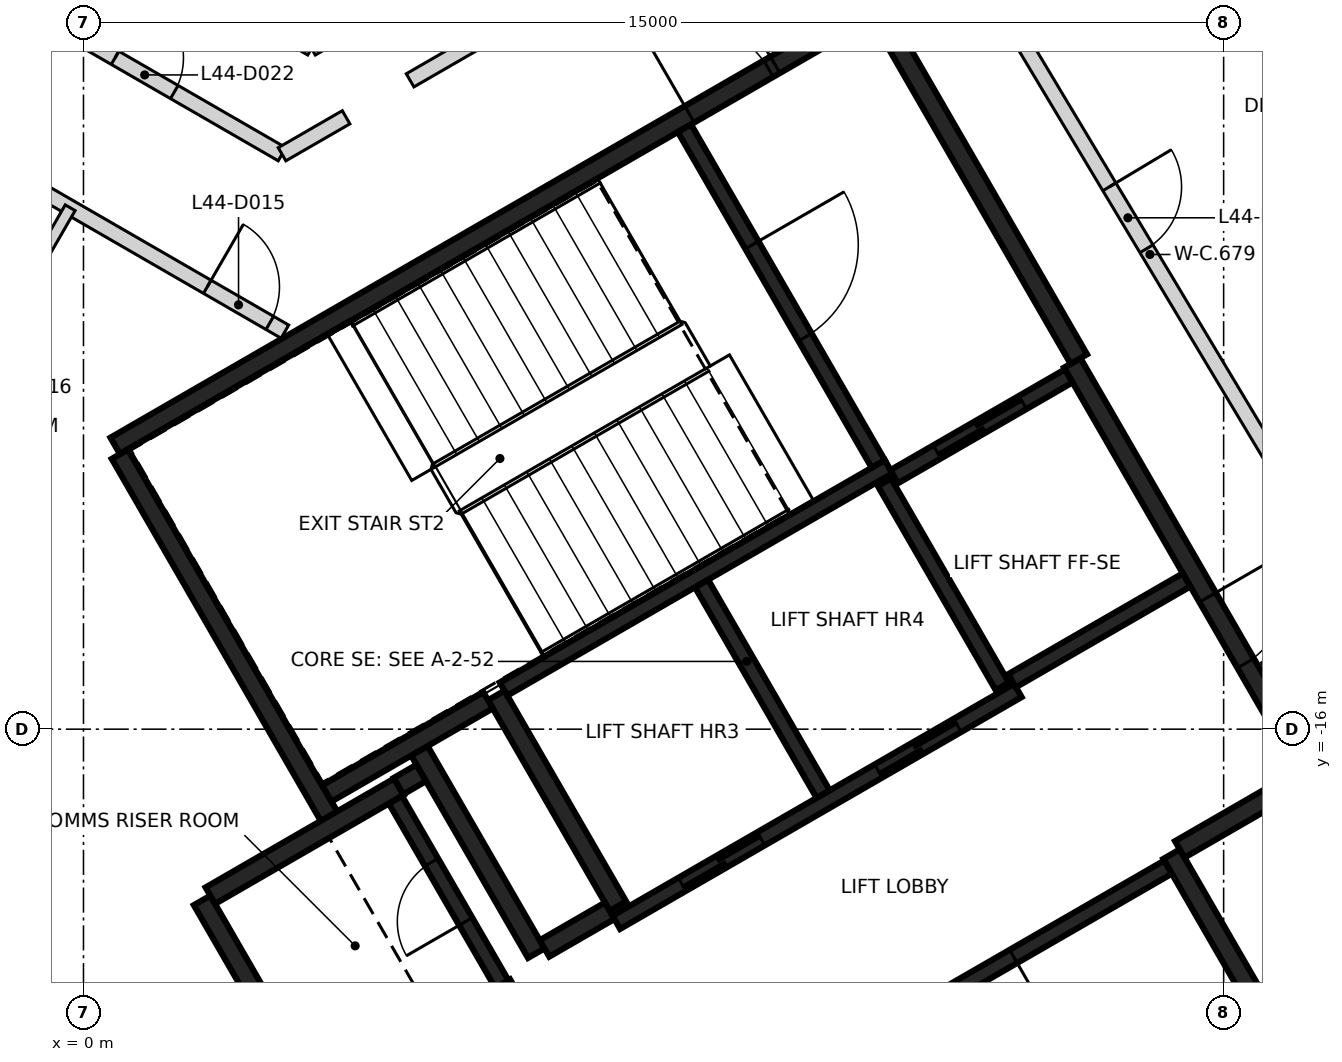
"""IFC4 building model, lengths in metres.
Left out: names, types, materials, properties, quantities, classifications, styles, units other than length and angle.
Written with IfcOpenShell. Run it as: python <this file> out.ifc"""

import sys

from ifc_helpers import new_model, si_unit, direction, frame, frame_2d, origin, place, context, subcontext, project, spatial, rectangle, extrude, element, fill, save


model = new_model("IFC4")
c1 = context("Model", 3, precision=1e-05, world=origin(), true_north=direction((0.0, 1.0)))
c2 = subcontext(c1, "Body", "Model", "MODEL_VIEW")
j1 = project(units=[si_unit("LENGTHUNIT", "METRE"), si_unit("PLANEANGLEUNIT", "RADIAN")], contexts=[c1])
p1 = place(None, origin())
s1 = spatial("IfcSite", under=j1, at=p1, CompositionType="ELEMENT")
p2 = place(p1, origin())
s2 = spatial("IfcBuilding", under=s1, at=p2, CompositionType="ELEMENT")
p3 = place(p2, frame((0.0, 0.0, 179.2)))
s3 = spatial("IfcBuildingStorey", under=s2, at=p3, CompositionType="ELEMENT", Elevation=179.2)
p4 = place(p3, frame((0.417, -12.273, 0.0), z_axis=(0.0, 0.0, 1.0), x_axis=(0.866021906294, 0.500006057782, 0.0)))
e1 = element("IfcWall", 1, at=p4, inside=s3, PredefinedType="SHEAR", context=c2, shape_type="SweptSolid", body=[
    extrude(rectangle(XDim=11.55, YDim=0.25, at=frame_2d((5.775, 0.0))), origin(), (0.0, 0.0, 1.0), 3.25),
])
p5 = place(p4, frame((10.025, 0.0, 0.0)))
e2 = element("IfcOpeningElement", 2, at=p5, cuts=e1, PredefinedType="OPENING", context=c2, shape_type="SweptSolid", body=[
    extrude(rectangle(XDim=1.2, YDim=2.1, at=frame_2d((0.6, 1.05))), frame((0.0, 0.135, 0.0), z_axis=(0.0, -1.0, 0.0), x_axis=(1.0, 0.0, 0.0)), (0.0, 0.0, 1.0), 0.27),
])
p6 = place(p4, frame((8.725, 0.0, 0.0)))
e3 = element("IfcOpeningElement", 3, at=p6, cuts=e1, PredefinedType="OPENING", context=c2, shape_type="SweptSolid", body=[
    extrude(rectangle(XDim=1.2, YDim=2.1, at=frame_2d((0.6, 1.05))), frame((0.0, 0.135, 0.0), z_axis=(0.0, -1.0, 0.0), x_axis=(1.0, 0.0, 0.0)), (0.0, 0.0, 1.0), 0.27),
])
p7 = place(p3, frame((13.008, -11.181, 0.0), z_axis=(0.0, 0.0, 1.0), x_axis=(0.500004234368, -0.866022959057, 0.0)))
e4 = element("IfcWall", 4, at=p7, inside=s3, PredefinedType="SHEAR", context=c2, shape_type="SweptSolid", body=[
    extrude(rectangle(XDim=6.25, YDim=0.25, at=frame_2d((3.125, 0.0))), origin(), (0.0, 0.0, 1.0), 3.25),
])
p8 = place(p7, frame((3.563, 0.0, 0.0)))
e5 = element("IfcOpeningElement", 5, at=p8, cuts=e4, PredefinedType="OPENING", context=c2, shape_type="SweptSolid", body=[
    extrude(rectangle(XDim=1.0, YDim=2.1, at=frame_2d((0.5, 1.05))), frame((0.0, 0.135, 0.0), z_axis=(0.0, -1.0, 0.0), x_axis=(1.0, 0.0, 0.0)), (0.0, 0.0, 1.0), 0.27),
])
p9 = place(p3, frame((3.235, -17.153, 0.0), z_axis=(0.0, 0.0, 1.0), x_axis=(-0.500008851346, 0.866020293397, 0.0)))
e6 = element("IfcWall", 6, at=p9, inside=s3, PredefinedType="SHEAR", context=c2, shape_type="SweptSolid", body=[
    extrude(rectangle(XDim=5.51, YDim=0.25, at=frame_2d((2.755, 0.0))), origin(), (0.0, 0.0, 1.0), 3.25),
])
p10 = place(p3, frame((10.483, -6.606, 0.0), z_axis=(0.0, 0.0, 1.0), x_axis=(0.49999885962, -0.866026062182, 0.0)))
e7 = element("IfcWall", 7, at=p10, inside=s3, PredefinedType="SHEAR", context=c2, shape_type="SweptSolid", body=[
    extrude(rectangle(XDim=5.225, YDim=0.25, at=frame_2d((2.612, 0.0))), origin(), (0.0, 0.0, 1.0), 3.25),
])
p11 = place(p3, frame((7.031, -18.327, 0.0), z_axis=(0.0, 0.0, 1.0), x_axis=(-0.499971222258, 0.866042017984, 0.0)))
e8 = element("IfcWall", 8, at=p11, inside=s3, PredefinedType="SHEAR", context=c2, shape_type="SweptSolid", body=[
    extrude(rectangle(XDim=3.2, YDim=0.25, at=frame_2d((1.6, 0.0))), origin(), (0.0, 0.0, 1.0), 3.25),
])
p12 = place(p3, frame((14.315, -17.644, 0.0), z_axis=(0.0, 0.0, 1.0), x_axis=(0.500023226632, -0.866011993467, 0.0)))
e9 = element("IfcWall", 9, at=p12, inside=s3, PredefinedType="SHEAR", context=c2, shape_type="SweptSolid", body=[
    extrude(rectangle(XDim=2.974, YDim=0.25, at=frame_2d((1.487, 0.0))), origin(), (0.0, 0.0, 1.0), 3.25),
])
p13 = place(p3, frame((3.085, -20.894, 0.0), z_axis=(0.0, 0.0, 1.0), x_axis=(-0.499978833458, 0.866037623948, 0.0)))
e10 = element("IfcWall", 10, at=p13, inside=s3, PredefinedType="SHEAR", context=c2, shape_type="SweptSolid", body=[
    extrude(rectangle(XDim=3.05, YDim=0.25, at=frame_2d((1.525, 0.0))), origin(), (0.0, 0.0, 1.0), 3.25),
])
p14 = place(p3, frame((1.669, -18.19, 0.0), z_axis=(0.0, 0.0, 1.0), x_axis=(0.866042235819, 0.499970844928, 0.0)))
e11 = element("IfcWall", 11, at=p14, inside=s3, PredefinedType="SHEAR", context=c2, shape_type="SweptSolid", body=[
    extrude(rectangle(XDim=2.865, YDim=0.25, at=frame_2d((1.432, 0.0))), origin(), (0.0, 0.0, 1.0), 3.25),
])
p15 = place(p3, frame((5.675, -19.399, 0.0), z_axis=(0.0, 0.0, 1.0), x_axis=(-0.866026637627, -0.499997862916, 0.0)))
e12 = element("IfcWall", 12, at=p15, inside=s3, PredefinedType="SHEAR", context=c2, shape_type="SweptSolid", body=[
    extrude(rectangle(XDim=2.865, YDim=0.25, at=frame_2d((1.432, 0.0))), origin(), (0.0, 0.0, 1.0), 3.25),
])
p16 = place(p3, frame((4.414, -16.276, 0.0), z_axis=(0.0, 0.0, 1.0), x_axis=(0.500003324108, -0.866023484601, 0.0)))
e13 = element("IfcWall", 13, at=p16, inside=s3, PredefinedType="SHEAR", context=c2, shape_type="SweptSolid", body=[
    extrude(rectangle(XDim=3.085, YDim=0.25, at=frame_2d((1.542, 0.0))), origin(), (0.0, 0.0, 1.0), 3.25),
])
p17 = place(p3, frame((5.322, -15.619, 0.0), z_axis=(0.0, 0.0, 1.0), x_axis=(-0.866026229868, -0.499998569178, 0.0)))
e14 = element("IfcWall", 14, at=p17, inside=s3, PredefinedType="SHEAR", context=c2, shape_type="SweptSolid", body=[
    extrude(rectangle(XDim=2.449, YDim=0.25, at=frame_2d((1.225, 0.0))), origin(), (0.0, 0.0, 1.0), 3.25),
])
p18 = place(p3, frame((16.025, -16.656, 0.0), z_axis=(0.0, 0.0, 1.0), x_axis=(-0.866016279763, -0.500015802937, 0.0)))
e15 = element("IfcWall", 15, at=p18, inside=s3, PredefinedType="SHEAR", context=c2, shape_type="SweptSolid", body=[
    extrude(rectangle(XDim=1.849, YDim=0.25, at=frame_2d((0.925, 0.0))), origin(), (0.0, 0.0, 1.0), 3.25),
])
p19 = place(p3, frame((6.065, -18.885, 0.0), z_axis=(0.0, 0.0, 1.0), x_axis=(0.866017078145, 0.500014420154, 0.0)))
e16 = element("IfcWall", 16, at=p19, inside=s3, PredefinedType="SHEAR", context=c2, shape_type="SweptSolid", body=[
    extrude(rectangle(XDim=0.989, YDim=0.25, at=frame_2d((0.495, 0.0))), origin(), (0.0, 0.0, 1.0), 3.25),
])
p20 = place(p3, frame((4.145, -16.749, 0.0), z_axis=(0.0, 0.0, 1.0), x_axis=(0.866185586049, 0.49972245349, 0.0)))
e17 = element("IfcWall", 17, at=p20, inside=s3, PredefinedType="SHEAR", context=c2, shape_type="SweptSolid", body=[
    extrude(rectangle(XDim=0.344, YDim=0.25, at=frame_2d((0.172, 0.0))), origin(), (0.0, 0.0, 1.0), 3.25),
])
p21 = place(p3, frame((5.526, -15.472, 0.0), z_axis=(0.0, 0.0, 1.0), x_axis=(0.866041752167, 0.499971682701, 0.0)))
e18 = element("IfcWall", 18, at=p21, inside=s3, PredefinedType="SHEAR", context=c2, shape_type="SweptSolid", body=[
    extrude(rectangle(XDim=5.851, YDim=0.2, at=frame_2d((2.925, 0.0))), origin(), (0.0, 0.0, 1.0), 3.25),
])
p22 = place(p3, frame((7.01, -18.542, 0.0), z_axis=(0.0, 0.0, 1.0), x_axis=(0.866030299012, 0.499991521122, 0.0)))
e19 = element("IfcWall", 19, at=p22, inside=s3, PredefinedType="SHEAR", context=c2, shape_type="SweptSolid", body=[
    extrude(rectangle(XDim=6.1, YDim=0.2, at=frame_2d((3.05, 0.0))), origin(), (0.0, 0.0, 1.0), 3.25),
])
p23 = place(p22, frame((1.0, 0.0, 0.0)))
e20 = element("IfcOpeningElement", 20, at=p23, cuts=e19, PredefinedType="OPENING", context=c2, shape_type="SweptSolid", body=[
    extrude(rectangle(XDim=1.2, YDim=2.1, at=frame_2d((0.6, 1.05))), frame((0.0, 0.11, 0.0), z_axis=(0.0, -1.0, 0.0), x_axis=(1.0, 0.0, 0.0)), (0.0, 0.0, 1.0), 0.22),
])
p24 = place(p22, frame((3.982, 0.0, 0.0)))
e21 = element("IfcOpeningElement", 21, at=p24, cuts=e19, PredefinedType="OPENING", context=c2, shape_type="SweptSolid", body=[
    extrude(rectangle(XDim=1.2, YDim=2.1, at=frame_2d((0.6, 1.05))), frame((0.0, 0.11, 0.0), z_axis=(0.0, -1.0, 0.0), x_axis=(1.0, 0.0, 0.0)), (0.0, 0.0, 1.0), 0.22),
])
p25 = place(p3, frame((14.268, -17.815, 0.0), z_axis=(0.0, 0.0, 1.0), x_axis=(-0.866033794273, -0.499985466966, 0.0)))
e22 = element("IfcWall", 22, at=p25, inside=s3, PredefinedType="SHEAR", context=c2, shape_type="SweptSolid", body=[
    extrude(rectangle(XDim=5.598, YDim=0.2, at=frame_2d((2.799, 0.0))), origin(), (0.0, 0.0, 1.0), 3.25),
])
p26 = place(p25, frame((2.349, 0.0, 0.0)))
e23 = element("IfcOpeningElement", 23, at=p26, cuts=e22, PredefinedType="OPENING", context=c2, shape_type="SweptSolid", body=[
    extrude(rectangle(XDim=0.9, YDim=2.1, at=frame_2d((0.45, 1.05))), frame((0.0, 0.11, 0.0), z_axis=(0.0, -1.0, 0.0), x_axis=(1.0, 0.0, 0.0)), (0.0, 0.0, 1.0), 0.22),
])
p27 = place(p3, frame((7.906, -8.094, 0.0), z_axis=(0.0, 0.0, 1.0), x_axis=(0.500027839223, -0.866009330205, 0.0)))
e24 = element("IfcWall", 24, at=p27, inside=s3, PredefinedType="SHEAR", context=c2, shape_type="SweptSolid", body=[
    extrude(rectangle(XDim=5.098, YDim=0.2, at=frame_2d((2.549, 0.0))), origin(), (0.0, 0.0, 1.0), 3.25),
])
p28 = place(p27, frame((1.774, 0.0, 0.0)))
e25 = element("IfcOpeningElement", 25, at=p28, cuts=e24, PredefinedType="OPENING", context=c2, shape_type="SweptSolid", body=[
    extrude(rectangle(XDim=1.4, YDim=2.1, at=frame_2d((0.7, 1.05))), frame((0.0, 0.11, 0.0), z_axis=(0.0, -1.0, 0.0), x_axis=(1.0, 0.0, 0.0)), (0.0, 0.0, 1.0), 0.22),
])
p29 = place(p3, frame((8.132, -14.084, 0.0), z_axis=(0.0, 0.0, 1.0), x_axis=(0.499997778408, -0.866026686418, 0.0)))
e26 = element("IfcWall", 26, at=p29, inside=s3, PredefinedType="SHEAR", context=c2, shape_type="SweptSolid", body=[
    extrude(rectangle(XDim=3.198, YDim=0.2, at=frame_2d((1.599, 0.0))), origin(), (0.0, 0.0, 1.0), 3.25),
])
p30 = place(p3, frame((5.503, -19.352, 0.0), z_axis=(0.0, 0.0, 1.0), x_axis=(-0.499986818241, 0.866033014143, 0.0)))
e27 = element("IfcWall", 27, at=p30, inside=s3, PredefinedType="SHEAR", context=c2, shape_type="SweptSolid", body=[
    extrude(rectangle(XDim=2.798, YDim=0.2, at=frame_2d((1.399, 0.0))), origin(), (0.0, 0.0, 1.0), 3.25),
])
p31 = place(p30, frame((0.949, 0.0, 0.0)))
e28 = element("IfcOpeningElement", 28, at=p31, cuts=e27, PredefinedType="OPENING", context=c2, shape_type="SweptSolid", body=[
    extrude(rectangle(XDim=0.9, YDim=2.1, at=frame_2d((0.45, 1.05))), frame((0.0, 0.11, 0.0), z_axis=(0.0, -1.0, 0.0), x_axis=(1.0, 0.0, 0.0)), (0.0, 0.0, 1.0), 0.22),
])
p32 = place(p3, frame((12.088, -15.437, 0.0), z_axis=(0.0, 0.0, 1.0), x_axis=(-0.500026960575, 0.86600983753, 0.0)))
e29 = element("IfcWall", 29, at=p32, inside=s3, PredefinedType="SHEAR", context=c2, shape_type="SweptSolid", body=[
    extrude(rectangle(XDim=3.1, YDim=0.2, at=frame_2d((1.55, 0.0))), origin(), (0.0, 0.0, 1.0), 3.25),
])
p33 = place(p3, frame((10.666, -12.678, 0.0), z_axis=(0.0, 0.0, 1.0), x_axis=(0.866018407898, 0.500012117035, 0.0)))
e30 = element("IfcWall", 30, at=p33, inside=s3, PredefinedType="SHEAR", context=c2, shape_type="SweptSolid", body=[
    extrude(rectangle(XDim=2.651, YDim=0.2, at=frame_2d((1.325, 0.0))), origin(), (0.0, 0.0, 1.0), 3.25),
])
p34 = place(p33, frame((0.652, 0.0, 0.0)))
e31 = element("IfcOpeningElement", 31, at=p34, cuts=e30, PredefinedType="OPENING", context=c2, shape_type="SweptSolid", body=[
    extrude(rectangle(XDim=1.3, YDim=2.1, at=frame_2d((0.65, 1.05))), frame((0.0, 0.11, 0.0), z_axis=(0.0, -1.0, 0.0), x_axis=(1.0, 0.0, 0.0)), (0.0, 0.0, 1.0), 0.22),
])
p35 = place(p3, frame((14.512, -14.037, 0.0), z_axis=(0.0, 0.0, 1.0), x_axis=(-0.866018407898, -0.500012117035, 0.0)))
e32 = element("IfcWall", 32, at=p35, inside=s3, PredefinedType="SHEAR", context=c2, shape_type="SweptSolid", body=[
    extrude(rectangle(XDim=2.651, YDim=0.2, at=frame_2d((1.325, 0.0))), origin(), (0.0, 0.0, 1.0), 3.25),
])
p36 = place(p3, frame((-8.612, -1.956, 0.0), z_axis=(0.0, 0.0, 1.0), x_axis=(0.866034386606, -0.499984440973, 0.0)))
e33 = element("IfcWall", 33, at=p36, inside=s3, PredefinedType="PARTITIONING", context=c2, shape_type="SweptSolid", body=[
    extrude(rectangle(XDim=12.96, YDim=0.2, at=frame_2d((6.48, 0.0))), origin(), (0.0, 0.0, 1.0), 3.25),
])
p37 = place(p36, frame((3.955, 0.0, 0.0)))
e34 = element("IfcOpeningElement", 34, at=p37, cuts=e33, PredefinedType="OPENING", context=c2, shape_type="SweptSolid", body=[
    extrude(rectangle(XDim=0.9, YDim=2.1, at=frame_2d((0.45, 1.05))), frame((0.0, 0.11, 0.0), z_axis=(0.0, -1.0, 0.0), x_axis=(1.0, 0.0, 0.0)), (0.0, 0.0, 1.0), 0.22),
])
p38 = place(p36, frame((10.424, 0.0, 0.0)))
e35 = element("IfcOpeningElement", 35, at=p38, cuts=e33, PredefinedType="OPENING", context=c2, shape_type="SweptSolid", body=[
    extrude(rectangle(XDim=0.9, YDim=2.1, at=frame_2d((0.45, 1.05))), frame((0.0, 0.11, 0.0), z_axis=(0.0, -1.0, 0.0), x_axis=(1.0, 0.0, 0.0)), (0.0, 0.0, 1.0), 0.22),
])
p39 = place(p3, frame((-8.33, -4.428, 0.0), z_axis=(0.0, 0.0, 1.0), x_axis=(0.865923263811, -0.500176869909, 0.0)))
e36 = element("IfcWall", 36, at=p39, inside=s3, PredefinedType="PARTITIONING", context=c2, shape_type="SweptSolid", body=[
    extrude(rectangle(XDim=12.68, YDim=0.2, at=frame_2d((6.34, 0.0))), origin(), (0.0, 0.0, 1.0), 3.25),
])
p40 = place(p39, frame((2.87, 0.0, 0.0)))
e37 = element("IfcOpeningElement", 37, at=p40, cuts=e36, PredefinedType="OPENING", context=c2, shape_type="SweptSolid", body=[
    extrude(rectangle(XDim=0.95, YDim=2.1, at=frame_2d((0.475, 1.05))), frame((0.0, 0.11, 0.0), z_axis=(0.0, -1.0, 0.0), x_axis=(1.0, 0.0, 0.0)), (0.0, 0.0, 1.0), 0.22),
])
p41 = place(p39, frame((11.5, 0.0, 0.0)))
e38 = element("IfcOpeningElement", 38, at=p41, cuts=e36, PredefinedType="OPENING", context=c2, shape_type="SweptSolid", body=[
    extrude(rectangle(XDim=0.95, YDim=2.1, at=frame_2d((0.475, 1.05))), frame((0.0, 0.11, 0.0), z_axis=(0.0, -1.0, 0.0), x_axis=(1.0, 0.0, 0.0)), (0.0, 0.0, 1.0), 0.22),
])
p42 = place(p3, frame((2.612, -8.437, 0.0), z_axis=(0.0, 0.0, 1.0), x_axis=(0.866026830048, 0.499997529631, 0.0)))
e39 = element("IfcWall", 39, at=p42, inside=s3, PredefinedType="PARTITIONING", context=c2, shape_type="SweptSolid", body=[
    extrude(rectangle(XDim=0.973, YDim=0.2, at=frame_2d((0.487, 0.0))), origin(), (0.0, 0.0, 1.0), 3.25),
])
p43 = place(p3, frame((4.297, -7.464, 0.0), z_axis=(0.0, 0.0, 1.0), x_axis=(0.866026378386, 0.499998311937, 0.0)))
e40 = element("IfcWall", 40, at=p43, inside=s3, PredefinedType="PARTITIONING", context=c2, shape_type="SweptSolid", body=[
    extrude(rectangle(XDim=1.966, YDim=0.2, at=frame_2d((0.983, 0.0))), origin(), (0.0, 0.0, 1.0), 3.25),
])
p44 = place(p3, frame((11.216, -5.058, 0.0), z_axis=(0.0, 0.0, 1.0), x_axis=(0.51393500197, -0.857829128527, 0.0)))
e41 = element("IfcWall", 41, at=p44, inside=s3, PredefinedType="PARTITIONING", context=c2, shape_type="SweptSolid", body=[
    extrude(rectangle(XDim=10.951, YDim=0.2, at=frame_2d((5.475, 0.0))), origin(), (0.0, 0.0, 1.0), 3.25),
])
p45 = place(p44, frame((4.438, 0.0, 0.0)))
e42 = element("IfcOpeningElement", 42, at=p45, cuts=e41, PredefinedType="OPENING", context=c2, shape_type="SweptSolid", body=[
    extrude(rectangle(XDim=0.95, YDim=2.1, at=frame_2d((0.475, 1.05))), frame((0.0, 0.11, 0.0), z_axis=(0.0, -1.0, 0.0), x_axis=(1.0, 0.0, 0.0)), (0.0, 0.0, 1.0), 0.22),
])
p46 = place(p3, frame((15.55, -15.213, 0.0), z_axis=(0.0, 0.0, 1.0), x_axis=(0.865989998118, 0.500061319399, 0.0)))
e43 = element("IfcWall", 43, at=p46, inside=s3, PredefinedType="PARTITIONING", context=c2, shape_type="SweptSolid", body=[
    extrude(rectangle(XDim=0.79, YDim=0.2, at=frame_2d((0.395, 0.0))), origin(), (0.0, 0.0, 1.0), 3.25),
])
p47 = place(p3, frame((-7.6, -0.924, 0.0), z_axis=(0.0, 0.0, 1.0), x_axis=(0.866028806638, -0.499994106039, 0.0)))
e44 = element("IfcWall", 44, at=p47, inside=s3, PredefinedType="PARTITIONING", context=c2, shape_type="SweptSolid", body=[
    extrude(rectangle(XDim=12.24, YDim=0.2, at=frame_2d((6.12, 0.0))), origin(), (0.0, 0.0, 1.0), 3.25),
])
p48 = place(p3, frame((3.0, -7.044, 0.0), z_axis=(0.0, 0.0, 1.0), x_axis=(0.865875248522, 0.500259986404, 0.0)))
e45 = element("IfcWall", 45, at=p48, inside=s3, PredefinedType="PARTITIONING", context=c2, shape_type="SweptSolid", body=[
    extrude(rectangle(XDim=1.848, YDim=0.2, at=frame_2d((0.924, 0.0))), origin(), (0.0, 0.0, 1.0), 3.25),
])
p49 = place(p3, frame((-1.371, -11.213, 0.0), z_axis=(0.0, 0.0, 1.0), x_axis=(0.499748946523, 0.866170301066, 0.0)))
e46 = element("IfcWall", 46, at=p49, inside=s3, PredefinedType="PARTITIONING", context=c2, shape_type="SweptSolid", body=[
    extrude(rectangle(XDim=2.393, YDim=0.15, at=frame_2d((1.197, 0.0))), origin(), (0.0, 0.0, 1.0), 3.25),
])
p50 = place(p49, frame((0.796, 0.0, 0.0)))
e47 = element("IfcOpeningElement", 47, at=p50, cuts=e46, PredefinedType="OPENING", context=c2, shape_type="SweptSolid", body=[
    extrude(rectangle(XDim=0.8, YDim=2.1, at=frame_2d((0.4, 1.05))), frame((0.0, 0.085, 0.0), z_axis=(0.0, -1.0, 0.0), x_axis=(1.0, 0.0, 0.0)), (0.0, 0.0, 1.0), 0.17),
])
p51 = place(p34, origin())
e48 = element("IfcDoor", 48, at=p51, inside=s3, OperationType="SLIDING_TO_RIGHT", PredefinedType="DOOR", context=c2, shape_type="SweptSolid", body=[
    extrude(rectangle(XDim=1.3, YDim=2.1, at=frame_2d((0.65, 1.05))), frame((0.0, 0.025, 0.0), z_axis=(0.0, -1.0, 0.0), x_axis=(1.0, 0.0, 0.0)), (0.0, 0.0, 1.0), 0.05),
])
fill(e31, e48)
p52 = place(p23, origin())
e49 = element("IfcDoor", 49, at=p52, inside=s3, OperationType="DOUBLE_DOOR_SLIDING", PredefinedType="DOOR", context=c2, shape_type="SweptSolid", body=[
    extrude(rectangle(XDim=1.2, YDim=2.1, at=frame_2d((0.6, 1.05))), frame((0.0, 0.025, 0.0), z_axis=(0.0, -1.0, 0.0), x_axis=(1.0, 0.0, 0.0)), (0.0, 0.0, 1.0), 0.05),
])
fill(e20, e49)
p53 = place(p24, origin())
e50 = element("IfcDoor", 50, at=p53, inside=s3, OperationType="DOUBLE_DOOR_SLIDING", PredefinedType="DOOR", context=c2, shape_type="SweptSolid", body=[
    extrude(rectangle(XDim=1.2, YDim=2.1, at=frame_2d((0.6, 1.05))), frame((0.0, 0.025, 0.0), z_axis=(0.0, -1.0, 0.0), x_axis=(1.0, 0.0, 0.0)), (0.0, 0.0, 1.0), 0.05),
])
fill(e21, e50)
p54 = place(p8, origin())
e51 = element("IfcDoor", 51, at=p54, inside=s3, OperationType="SINGLE_SWING_LEFT", PredefinedType="DOOR", context=c2, shape_type="SweptSolid", body=[
    extrude(rectangle(XDim=1.0, YDim=2.1, at=frame_2d((0.5, 1.05))), frame((0.0, 0.025, 0.0), z_axis=(0.0, -1.0, 0.0), x_axis=(1.0, 0.0, 0.0)), (0.0, 0.0, 1.0), 0.05),
])
fill(e5, e51)
p55 = place(p5, origin())
e52 = element("IfcDoor", 52, at=p55, inside=s3, OperationType="SINGLE_SWING_LEFT", PredefinedType="DOOR", context=c2, shape_type="SweptSolid", body=[
    extrude(rectangle(XDim=1.2, YDim=2.1, at=frame_2d((0.6, 1.05))), frame((0.0, 0.025, 0.0), z_axis=(0.0, -1.0, 0.0), x_axis=(1.0, 0.0, 0.0)), (0.0, 0.0, 1.0), 0.05),
])
fill(e2, e52)
p56 = place(p6, origin())
e53 = element("IfcDoor", 53, at=p56, inside=s3, OperationType="SINGLE_SWING_RIGHT", PredefinedType="DOOR", context=c2, shape_type="SweptSolid", body=[
    extrude(rectangle(XDim=1.2, YDim=2.1, at=frame_2d((0.6, 1.05))), frame((0.0, 0.025, 0.0), z_axis=(0.0, -1.0, 0.0), x_axis=(1.0, 0.0, 0.0)), (0.0, 0.0, 1.0), 0.05),
])
fill(e3, e53)
p57 = place(p28, origin())
e54 = element("IfcDoor", 54, at=p57, inside=s3, OperationType="SINGLE_SWING_RIGHT", PredefinedType="DOOR", context=c2, shape_type="SweptSolid", body=[
    extrude(rectangle(XDim=1.4, YDim=2.1, at=frame_2d((0.7, 1.05))), frame((0.0, 0.025, 0.0), z_axis=(0.0, -1.0, 0.0), x_axis=(1.0, 0.0, 0.0)), (0.0, 0.0, 1.0), 0.05),
])
fill(e25, e54)
p58 = place(p26, origin())
e55 = element("IfcDoor", 55, at=p58, inside=s3, OperationType="SINGLE_SWING_LEFT", PredefinedType="DOOR", context=c2, shape_type="SweptSolid", body=[
    extrude(rectangle(XDim=0.9, YDim=2.1, at=frame_2d((0.45, 1.05))), frame((0.0, 0.025, 0.0), z_axis=(0.0, -1.0, 0.0), x_axis=(1.0, 0.0, 0.0)), (0.0, 0.0, 1.0), 0.05),
])
fill(e23, e55)
p59 = place(p31, origin())
e56 = element("IfcDoor", 56, at=p59, inside=s3, OperationType="SINGLE_SWING_RIGHT", PredefinedType="DOOR", context=c2, shape_type="SweptSolid", body=[
    extrude(rectangle(XDim=0.9, YDim=2.1, at=frame_2d((0.45, 1.05))), frame((0.0, 0.025, 0.0), z_axis=(0.0, -1.0, 0.0), x_axis=(1.0, 0.0, 0.0)), (0.0, 0.0, 1.0), 0.05),
])
fill(e28, e56)
p60 = place(p45, origin())
e57 = element("IfcDoor", 57, at=p60, inside=s3, OperationType="SINGLE_SWING_LEFT", PredefinedType="DOOR", context=c2, shape_type="SweptSolid", body=[
    extrude(rectangle(XDim=0.95, YDim=2.1, at=frame_2d((0.475, 1.05))), frame((0.0, 0.025, 0.0), z_axis=(0.0, -1.0, 0.0), x_axis=(1.0, 0.0, 0.0)), (0.0, 0.0, 1.0), 0.05),
])
fill(e42, e57)
p61 = place(p41, frame((0.95, 0.0, 0.0), z_axis=(0.0, 0.0, 1.0), x_axis=(-1.0, 0.0, 0.0)))
e58 = element("IfcDoor", 58, at=p61, inside=s3, OperationType="SINGLE_SWING_LEFT", PredefinedType="DOOR", context=c2, shape_type="SweptSolid", body=[
    extrude(rectangle(XDim=0.95, YDim=2.1, at=frame_2d((0.475, 1.05))), frame((0.0, 0.025, 0.0), z_axis=(0.0, -1.0, 0.0), x_axis=(1.0, 0.0, 0.0)), (0.0, 0.0, 1.0), 0.05),
])
fill(e38, e58)
p62 = place(p38, origin())
e59 = element("IfcDoor", 59, at=p62, inside=s3, OperationType="SINGLE_SWING_LEFT", PredefinedType="DOOR", context=c2, shape_type="SweptSolid", body=[
    extrude(rectangle(XDim=0.9, YDim=2.1, at=frame_2d((0.45, 1.05))), frame((0.0, 0.025, 0.0), z_axis=(0.0, -1.0, 0.0), x_axis=(1.0, 0.0, 0.0)), (0.0, 0.0, 1.0), 0.05),
])
fill(e35, e59)
save(model, sys.argv[1])
